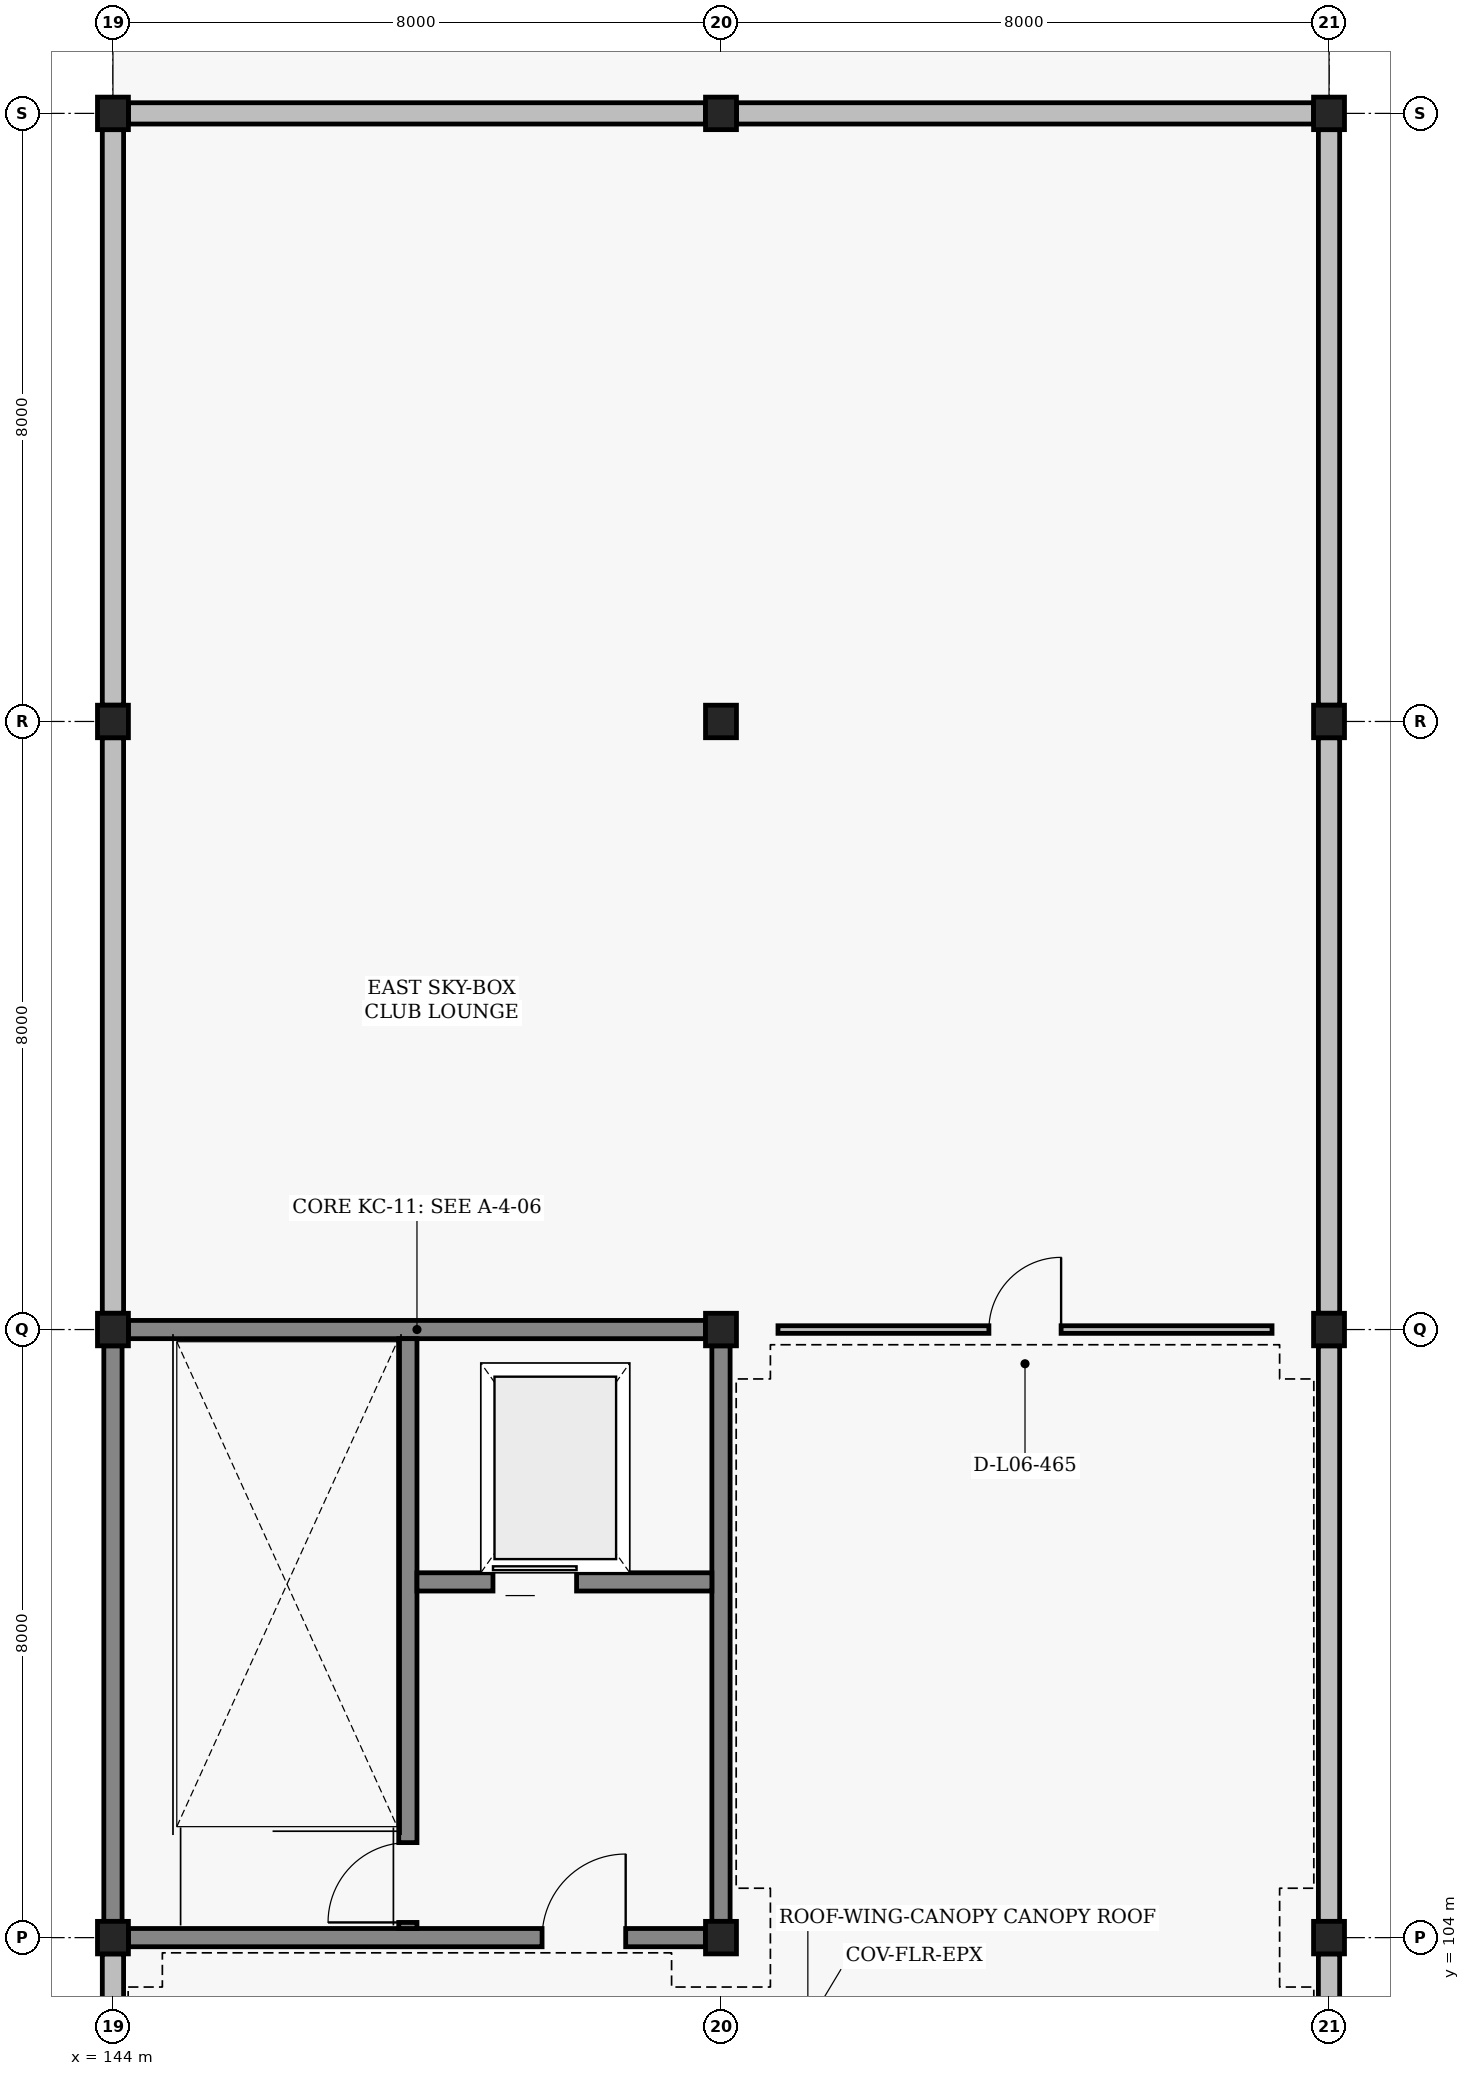
"""IFC4 building model, lengths in metres.
Left out: names, types, materials, properties, quantities, classifications, styles, units other than length and angle.
Written with IfcOpenShell. Run it as: python <this file> out.ifc"""

import sys

from ifc_helpers import new_model, si_unit, direction, frame, frame_2d, origin, origin_2d, place, context, subcontext, project, spatial, rectangle, i_section, extrude, element, fill, save


model = new_model("IFC4")
c1 = context("Model", 3, precision=1e-05, world=origin(), true_north=direction((0.0, 1.0)))
c2 = subcontext(c1, "Body", "Model", "MODEL_VIEW")
j1 = project(units=[si_unit("LENGTHUNIT", "METRE"), si_unit("PLANEANGLEUNIT", "RADIAN")], contexts=[c1])
p1 = place(None, origin())
s1 = spatial("IfcSite", under=j1, at=p1, CompositionType="ELEMENT")
p2 = place(p1, origin())
s2 = spatial("IfcBuilding", under=s1, at=p2, CompositionType="ELEMENT")
p3 = place(p2, frame((0.0, 0.0, 22.8)))
s3 = spatial("IfcBuildingStorey", under=s2, at=p3, CompositionType="ELEMENT", Elevation=22.8)
for number, where, z_axis, x_axis in (
    (1, (144.0, 104.0, 0.0), (0.0, 0.0, 1.0), (1.0, 0.0, 0.0)),
    (2, (144.0, 112.0, 0.0), (0.0, 0.0, 1.0), (1.0, 0.0, 0.0)),
    (3, (144.0, 120.0, 0.0), (0.0, 0.0, 1.0), (1.0, 0.0, 0.0)),
    (4, (144.0, 128.0, 0.0), (0.0, 0.0, 1.0), (1.0, 0.0, 0.0)),
    (5, (152.0, 104.0, 0.0), (0.0, 0.0, 1.0), (1.0, 0.0, 0.0)),
    (6, (152.0, 112.0, 0.0), (0.0, 0.0, 1.0), (1.0, 0.0, 0.0)),
    (7, (152.0, 120.0, 0.0), (0.0, 0.0, 1.0), (1.0, 0.0, 0.0)),
    (8, (152.0, 128.0, 0.0), (0.0, 0.0, 1.0), (1.0, 0.0, 0.0)),
    (9, (160.0, 104.0, 0.0), (0.0, 0.0, 1.0), (1.0, 0.0, 0.0)),
    (10, (160.0, 112.0, 0.0), (0.0, 0.0, 1.0), (1.0, 0.0, 0.0)),
    (11, (160.0, 120.0, 0.0), (0.0, 0.0, 1.0), (1.0, 0.0, 0.0)),
    (12, (160.0, 128.0, 0.0), (0.0, 0.0, 1.0), (1.0, 0.0, 0.0)),
):
    element("IfcColumn", number, at=place(p3, frame(where, z_axis=z_axis, x_axis=x_axis)), inside=s3, PredefinedType="COLUMN", context=c2, shape_type="SweptSolid", body=[
        extrude(i_section(OverallWidth=0.407, OverallDepth=0.428, WebThickness=0.02, FlangeThickness=0.035, at=origin_2d()), origin(), (0.0, 0.0, 1.0), 4.2),
    ])
for number, where, z_axis, x_axis in (
    (13, (144.0, 96.214, 0.0), (0.0, 0.0, 1.0), (0.0, 1.0, 0.0)),
    (14, (144.0, 112.214, 0.0), (0.0, 0.0, 1.0), (0.0, 1.0, 0.0)),
):
    element("IfcWall", number, at=place(p3, frame(where, z_axis=z_axis, x_axis=x_axis)), inside=s3, PredefinedType="SOLIDWALL", context=c2, shape_type="SweptSolid", body=[
        extrude(rectangle(XDim=7.572, YDim=0.28, at=frame_2d((3.786, 0.0))), origin(), (0.0, 0.0, 1.0), 3.35),
    ])
p4 = place(p3, frame((144.204, 128.0, 0.0), z_axis=(0.0, 0.0, 1.0), x_axis=(1.0, 0.0, 0.0)))
e15 = element("IfcWall", 15, at=p4, inside=s3, PredefinedType="SOLIDWALL", context=c2, shape_type="SweptSolid", body=[
    extrude(rectangle(XDim=7.592, YDim=0.28, at=frame_2d((3.796, 0.0))), origin(), (0.0, 0.0, 1.0), 3.35),
])
for number, where, z_axis, x_axis in (
    (16, (144.0, 120.214, 0.0), (0.0, 0.0, 1.0), (0.0, 1.0, 0.0)),
    (17, (160.0, 96.214, 0.0), (0.0, 0.0, 1.0), (0.0, 1.0, 0.0)),
    (18, (160.0, 104.214, 0.0), (0.0, 0.0, 1.0), (0.0, 1.0, 0.0)),
    (19, (160.0, 112.214, 0.0), (0.0, 0.0, 1.0), (0.0, 1.0, 0.0)),
):
    element("IfcWall", number, at=place(p3, frame(where, z_axis=z_axis, x_axis=x_axis)), inside=s3, PredefinedType="SOLIDWALL", context=c2, shape_type="SweptSolid", body=[
        extrude(rectangle(XDim=7.572, YDim=0.28, at=frame_2d((3.786, 0.0))), origin(), (0.0, 0.0, 1.0), 3.35),
    ])
p5 = place(p3, frame((152.204, 128.0, 0.0), z_axis=(0.0, 0.0, 1.0), x_axis=(1.0, 0.0, 0.0)))
e20 = element("IfcWall", 20, at=p5, inside=s3, PredefinedType="SOLIDWALL", context=c2, shape_type="SweptSolid", body=[
    extrude(rectangle(XDim=7.592, YDim=0.28, at=frame_2d((3.796, 0.0))), origin(), (0.0, 0.0, 1.0), 3.35),
])
p6 = place(p3, frame((160.0, 120.214, 0.0), z_axis=(0.0, 0.0, 1.0), x_axis=(0.0, 1.0, 0.0)))
e21 = element("IfcWall", 21, at=p6, inside=s3, PredefinedType="SOLIDWALL", context=c2, shape_type="SweptSolid", body=[
    extrude(rectangle(XDim=7.572, YDim=0.28, at=frame_2d((3.786, 0.0))), origin(), (0.0, 0.0, 1.0), 3.35),
])
p7 = place(p3, frame((144.204, 104.0, 0.0), z_axis=(0.0, 0.0, 1.0), x_axis=(1.0, 0.0, 0.0)))
e22 = element("IfcWall", 22, at=p7, inside=s3, PredefinedType="SHEAR", context=c2, shape_type="SweptSolid", body=[
    extrude(rectangle(XDim=7.592, YDim=0.24, at=frame_2d((3.796, 0.0))), origin(), (0.0, 0.0, 1.0), 3.37),
])
p8 = place(p7, frame((5.442, 0.0, 0.0)))
e23 = element("IfcOpeningElement", 23, at=p8, cuts=e22, PredefinedType="OPENING", context=c2, shape_type="SweptSolid", body=[
    extrude(rectangle(XDim=1.1, YDim=2.2, at=frame_2d((0.55, 1.1))), frame((0.0, 0.13, 0.0), z_axis=(0.0, -1.0, 0.0), x_axis=(1.0, 0.0, 0.0)), (0.0, 0.0, 1.0), 0.26),
])
p9 = place(p3, frame((144.204, 112.0, 0.0), z_axis=(0.0, 0.0, 1.0), x_axis=(1.0, 0.0, 0.0)))
e24 = element("IfcWall", 24, at=p9, inside=s3, PredefinedType="SHEAR", context=c2, shape_type="SweptSolid", body=[
    extrude(rectangle(XDim=7.592, YDim=0.24, at=frame_2d((3.796, 0.0))), origin(), (0.0, 0.0, 1.0), 3.37),
])
for number, where, z_axis, x_axis in (
    (25, (144.0, 104.214, 0.0), (0.0, 0.0, 1.0), (0.0, 1.0, 0.0)),
    (26, (152.0, 104.214, 0.0), (0.0, 0.0, 1.0), (0.0, 1.0, 0.0)),
):
    element("IfcWall", number, at=place(p3, frame(where, z_axis=z_axis, x_axis=x_axis)), inside=s3, PredefinedType="SHEAR", context=c2, shape_type="SweptSolid", body=[
        extrude(rectangle(XDim=7.572, YDim=0.24, at=frame_2d((3.786, 0.0))), origin(), (0.0, 0.0, 1.0), 3.37),
    ])
p10 = place(p3, frame((147.88, 104.12, 0.0), z_axis=(0.0, 0.0, 1.0), x_axis=(0.0, 1.0, 0.0)))
e27 = element("IfcWall", 27, at=p10, inside=s3, PredefinedType="SHEAR", context=c2, shape_type="SweptSolid", body=[
    extrude(rectangle(XDim=7.76, YDim=0.24, at=frame_2d((3.88, 0.0))), origin(), (0.0, 0.0, 1.0), 3.47),
])
p11 = place(p10, frame((0.08, 0.0, 0.0)))
e28 = element("IfcOpeningElement", 28, at=p11, cuts=e27, PredefinedType="OPENING", context=c2, shape_type="SweptSolid", body=[
    extrude(rectangle(XDim=1.05, YDim=2.15, at=frame_2d((0.525, 1.075))), frame((0.0, 0.13, 0.0), z_axis=(0.0, -1.0, 0.0), x_axis=(1.0, 0.0, 0.0)), (0.0, 0.0, 1.0), 0.26),
])
p12 = place(p3, frame((148.0, 108.68, 0.0), z_axis=(0.0, 0.0, 1.0), x_axis=(1.0, 0.0, 0.0)))
e29 = element("IfcWall", 29, at=p12, inside=s3, PredefinedType="SHEAR", context=c2, shape_type="SweptSolid", body=[
    extrude(rectangle(XDim=3.88, YDim=0.24, at=frame_2d((1.94, 0.0))), origin(), (0.0, 0.0, 1.0), 3.37),
])
p13 = place(p12, frame((1.0, 0.0, 0.0)))
e30 = element("IfcOpeningElement", 30, at=p13, cuts=e29, PredefinedType="OPENING", context=c2, shape_type="SweptSolid", body=[
    extrude(rectangle(XDim=1.1, YDim=2.15, at=frame_2d((0.55, 1.075))), frame((0.0, 0.13, 0.0), z_axis=(0.0, -1.0, 0.0), x_axis=(1.0, 0.0, 0.0)), (0.0, 0.0, 1.0), 0.26),
])
p14 = place(p3, frame((152.75, 112.0, 0.0), z_axis=(0.0, 0.0, 1.0), x_axis=(1.0, 0.0, 0.0)))
e31 = element("IfcWall", 31, at=p14, inside=s3, PredefinedType="PARTITIONING", context=c2, shape_type="SweptSolid", body=[
    extrude(rectangle(XDim=6.5, YDim=0.1, at=frame_2d((3.25, 0.0))), origin(), (0.0, 0.0, 1.0), 3.47),
])
p15 = place(p14, frame((2.775, 0.0, 0.0)))
e32 = element("IfcOpeningElement", 32, at=p15, cuts=e31, PredefinedType="OPENING", context=c2, shape_type="SweptSolid", body=[
    extrude(rectangle(XDim=0.95, YDim=2.1, at=frame_2d((0.475, 1.05))), frame((0.0, 0.06, 0.0), z_axis=(0.0, -1.0, 0.0), x_axis=(1.0, 0.0, 0.0)), (0.0, 0.0, 1.0), 0.12),
])
p16 = place(p8, origin())
e33 = element("IfcDoor", 33, at=p16, inside=s3, OperationType="SINGLE_SWING_RIGHT", PredefinedType="DOOR", context=c2, shape_type="SweptSolid", body=[
    extrude(rectangle(XDim=1.1, YDim=2.2, at=frame_2d((0.55, 1.1))), frame((0.0, 0.025, 0.0), z_axis=(0.0, -1.0, 0.0), x_axis=(1.0, 0.0, 0.0)), (0.0, 0.0, 1.0), 0.05),
])
fill(e23, e33)
p17 = place(p11, origin())
e34 = element("IfcDoor", 34, at=p17, inside=s3, OperationType="SINGLE_SWING_LEFT", PredefinedType="DOOR", context=c2, shape_type="SweptSolid", body=[
    extrude(rectangle(XDim=1.05, YDim=2.15, at=frame_2d((0.525, 1.075))), frame((0.0, 0.025, 0.0), z_axis=(0.0, -1.0, 0.0), x_axis=(1.0, 0.0, 0.0)), (0.0, 0.0, 1.0), 0.05),
])
fill(e28, e34)
p18 = place(p13, origin())
e35 = element("IfcDoor", 35, at=p18, inside=s3, OperationType="SLIDING_TO_LEFT", PredefinedType="DOOR", context=c2, shape_type="SweptSolid", body=[
    extrude(rectangle(XDim=1.1, YDim=2.15, at=frame_2d((0.55, 1.075))), frame((0.0, 0.025, 0.0), z_axis=(0.0, -1.0, 0.0), x_axis=(1.0, 0.0, 0.0)), (0.0, 0.0, 1.0), 0.05),
])
fill(e30, e35)
p19 = place(p15, origin())
e36 = element("IfcDoor", 36, at=p19, inside=s3, OperationType="SINGLE_SWING_RIGHT", PredefinedType="DOOR", context=c2, shape_type="SweptSolid", body=[
    extrude(rectangle(XDim=0.95, YDim=2.1, at=frame_2d((0.475, 1.05))), frame((0.0, 0.025, 0.0), z_axis=(0.0, -1.0, 0.0), x_axis=(1.0, 0.0, 0.0)), (0.0, 0.0, 1.0), 0.05),
])
fill(e32, e36)
save(model, sys.argv[1])
